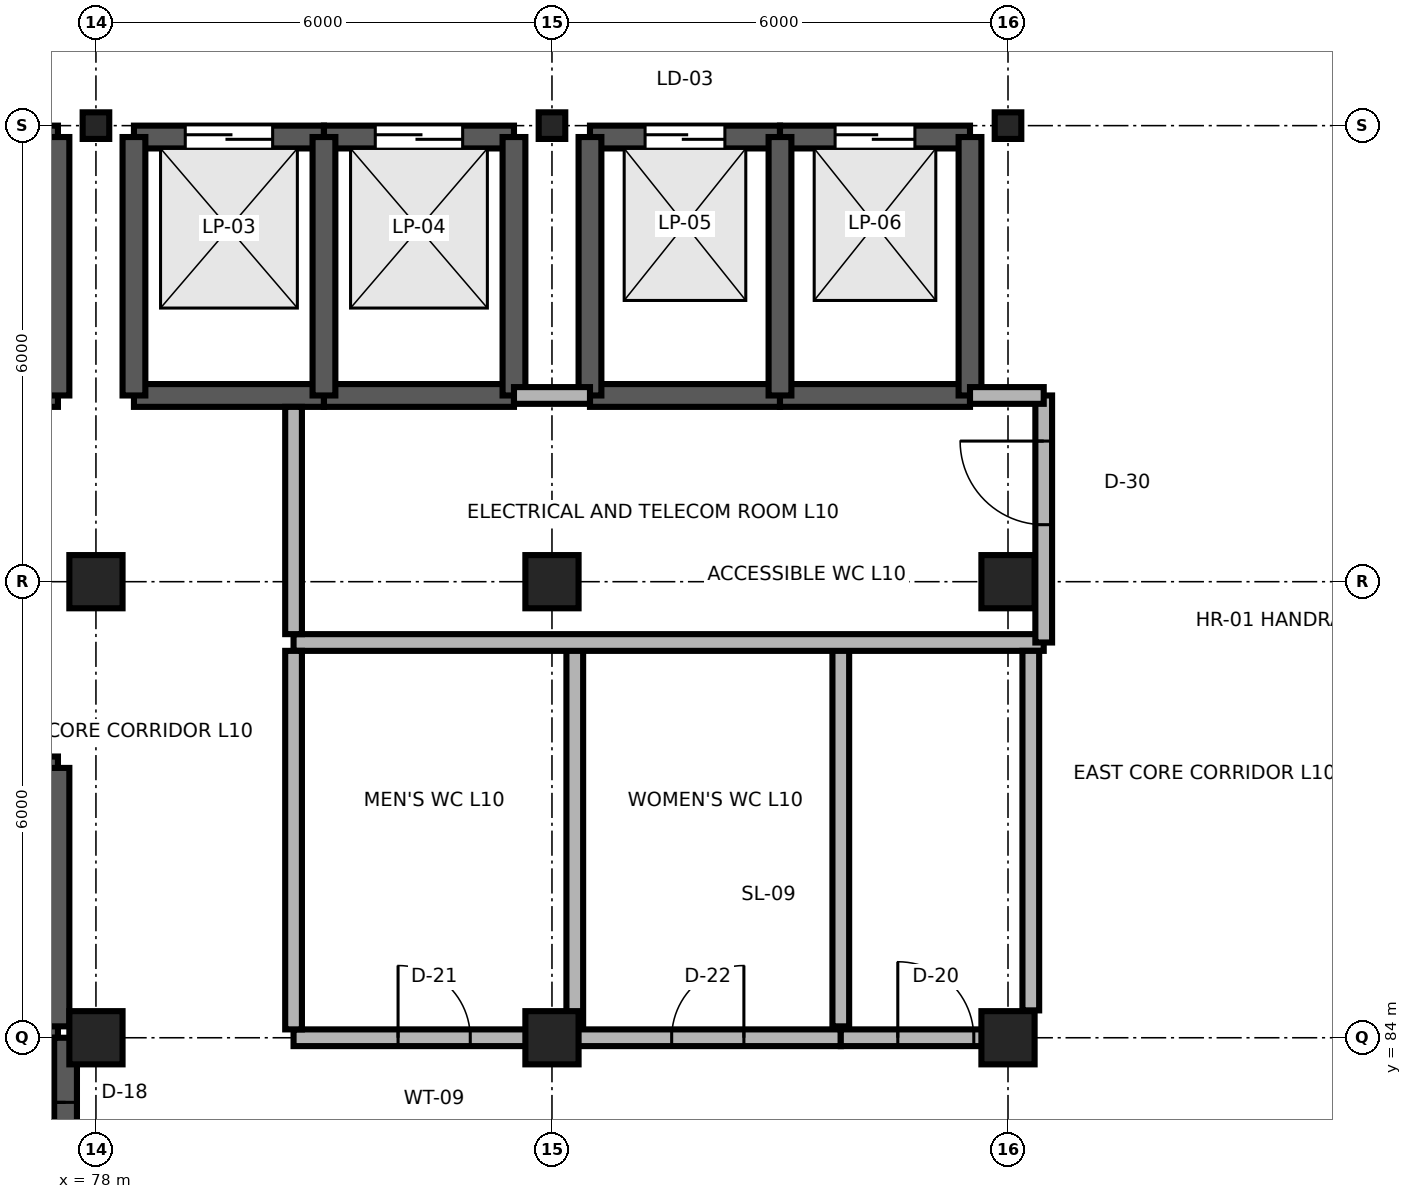
"""IFC4 building model, lengths in metres.
Left out: names, types, materials, properties, quantities, classifications, styles, units other than length and angle.
Written with IfcOpenShell. Run it as: python <this file> out.ifc"""

import sys

from ifc_helpers import new_model, si_unit, direction, frame, frame_2d, origin, origin_2d, place, context, subcontext, project, spatial, rectangle, i_section, extrude, element, fill, save


model = new_model("IFC4")
c1 = context("Model", 3, precision=1e-05, world=origin(), true_north=direction((0.0, 1.0)))
c2 = subcontext(c1, "Body", "Model", "MODEL_VIEW")
j1 = project(units=[si_unit("LENGTHUNIT", "METRE"), si_unit("PLANEANGLEUNIT", "RADIAN")], contexts=[c1])
p1 = place(None, origin())
s1 = spatial("IfcSite", under=j1, at=p1, CompositionType="ELEMENT")
p2 = place(p1, origin())
s2 = spatial("IfcBuilding", under=s1, at=p2, CompositionType="ELEMENT")
p3 = place(p2, frame((0.0, 0.0, 40.5)))
s3 = spatial("IfcBuildingStorey", under=s2, at=p3, CompositionType="ELEMENT", Elevation=40.5)
for number, where, z_axis, x_axis in (
    (1, (78.0, 84.0, 0.0), (0.0, 0.0, 1.0), (1.0, 0.0, 0.0)),
    (2, (84.0, 84.0, 0.0), (0.0, 0.0, 1.0), (1.0, 0.0, 0.0)),
    (3, (90.0, 84.0, 0.0), (0.0, 0.0, 1.0), (1.0, 0.0, 0.0)),
    (4, (78.0, 90.0, 0.0), (0.0, 0.0, 1.0), (1.0, 0.0, 0.0)),
    (5, (84.0, 90.0, 0.0), (0.0, 0.0, 1.0), (1.0, 0.0, 0.0)),
    (6, (90.0, 90.0, 0.0), (0.0, 0.0, 1.0), (1.0, 0.0, 0.0)),
):
    element("IfcColumn", number, at=place(p3, frame(where, z_axis=z_axis, x_axis=x_axis)), inside=s3, PredefinedType="COLUMN", context=c2, shape_type="SweptSolid", body=[
        extrude(rectangle(XDim=0.7, YDim=0.7, at=origin_2d()), origin(), (0.0, 0.0, 1.0), 3.9),
    ])
for number, where, z_axis, x_axis in (
    (7, (78.0, 96.0, 0.0), (0.0, 0.0, 1.0), (1.0, 0.0, 0.0)),
    (8, (84.0, 96.0, 0.0), (0.0, 0.0, 1.0), (1.0, 0.0, 0.0)),
    (9, (90.0, 96.0, 0.0), (0.0, 0.0, 1.0), (1.0, 0.0, 0.0)),
):
    element("IfcColumn", number, at=place(p3, frame(where, z_axis=z_axis, x_axis=x_axis)), inside=s3, PredefinedType="COLUMN", context=c2, shape_type="SweptSolid", body=[
        extrude(i_section(OverallWidth=0.35, OverallDepth=0.35, WebThickness=0.012, FlangeThickness=0.019, FilletRadius=0.02, at=origin_2d()), origin(), (0.0, 0.0, 1.0), 3.9),
    ])
p4 = place(p3, frame((75.0, 84.15, 0.0), z_axis=(0.0, 0.0, 1.0), x_axis=(1.0, 0.0, 0.0)))
e10 = element("IfcWall", 10, at=p4, inside=s3, PredefinedType="SHEAR", context=c2, shape_type="SweptSolid", body=[
    extrude(rectangle(XDim=2.5, YDim=0.3, at=frame_2d((1.25, 0.0))), origin(), (0.0, 0.0, 1.0), 3.74),
])
p5 = place(p4, frame((0.7, 0.0, 0.0)))
e11 = element("IfcOpeningElement", 11, at=p5, cuts=e10, PredefinedType="OPENING", context=c2, shape_type="SweptSolid", body=[
    extrude(rectangle(XDim=1.1, YDim=2.1, at=frame_2d((0.55, 1.05))), frame((0.0, 0.165, 0.0), z_axis=(0.0, -1.0, 0.0), x_axis=(1.0, 0.0, 0.0)), (0.0, 0.0, 1.0), 0.33),
])
p6 = place(p3, frame((75.0, 87.55, 0.0), z_axis=(0.0, 0.0, 1.0), x_axis=(1.0, 0.0, 0.0)))
e12 = element("IfcWall", 12, at=p6, inside=s3, PredefinedType="SHEAR", context=c2, shape_type="SweptSolid", body=[
    extrude(rectangle(XDim=2.5, YDim=0.3, at=frame_2d((1.25, 0.0))), origin(), (0.0, 0.0, 1.0), 3.74),
])
p7 = place(p3, frame((77.5, 84.15, 0.0), z_axis=(0.0, 0.0, 1.0), x_axis=(0.0, 1.0, 0.0)))
e13 = element("IfcWall", 13, at=p7, inside=s3, PredefinedType="SHEAR", context=c2, shape_type="SweptSolid", body=[
    extrude(rectangle(XDim=3.4, YDim=0.3, at=frame_2d((1.7, 0.0))), origin(), (0.0, 0.0, 1.0), 3.74),
])
p8 = place(p3, frame((75.0, 95.85, 0.0), z_axis=(0.0, 0.0, 1.0), x_axis=(1.0, 0.0, 0.0)))
e14 = element("IfcWall", 14, at=p8, inside=s3, PredefinedType="SHEAR", context=c2, shape_type="SweptSolid", body=[
    extrude(rectangle(XDim=2.5, YDim=0.3, at=frame_2d((1.25, 0.0))), origin(), (0.0, 0.0, 1.0), 3.74),
])
p9 = place(p8, frame((0.675, 0.0, 0.0)))
e15 = element("IfcOpeningElement", 15, at=p9, cuts=e14, PredefinedType="OPENING", context=c2, shape_type="SweptSolid", body=[
    extrude(rectangle(XDim=1.15, YDim=2.15, at=frame_2d((0.575, 1.075))), frame((0.0, 0.165, 0.0), z_axis=(0.0, -1.0, 0.0), x_axis=(1.0, 0.0, 0.0)), (0.0, 0.0, 1.0), 0.33),
])
p10 = place(p3, frame((75.0, 92.45, 0.0), z_axis=(0.0, 0.0, 1.0), x_axis=(1.0, 0.0, 0.0)))
e16 = element("IfcWall", 16, at=p10, inside=s3, PredefinedType="SHEAR", context=c2, shape_type="SweptSolid", body=[
    extrude(rectangle(XDim=2.5, YDim=0.3, at=frame_2d((1.25, 0.0))), origin(), (0.0, 0.0, 1.0), 3.74),
])
p11 = place(p3, frame((77.5, 92.45, 0.0), z_axis=(0.0, 0.0, 1.0), x_axis=(0.0, 1.0, 0.0)))
e17 = element("IfcWall", 17, at=p11, inside=s3, PredefinedType="SHEAR", context=c2, shape_type="SweptSolid", body=[
    extrude(rectangle(XDim=3.4, YDim=0.3, at=frame_2d((1.7, 0.0))), origin(), (0.0, 0.0, 1.0), 3.74),
])
p12 = place(p3, frame((78.5, 95.85, 0.0), z_axis=(0.0, 0.0, 1.0), x_axis=(1.0, 0.0, 0.0)))
e18 = element("IfcWall", 18, at=p12, inside=s3, PredefinedType="SHEAR", context=c2, shape_type="SweptSolid", body=[
    extrude(rectangle(XDim=2.5, YDim=0.3, at=frame_2d((1.25, 0.0))), origin(), (0.0, 0.0, 1.0), 3.74),
])
p13 = place(p12, frame((0.675, 0.0, 0.0)))
e19 = element("IfcOpeningElement", 19, at=p13, cuts=e18, PredefinedType="OPENING", context=c2, shape_type="SweptSolid", body=[
    extrude(rectangle(XDim=1.15, YDim=2.15, at=frame_2d((0.575, 1.075))), frame((0.0, 0.165, 0.0), z_axis=(0.0, -1.0, 0.0), x_axis=(1.0, 0.0, 0.0)), (0.0, 0.0, 1.0), 0.33),
])
p14 = place(p3, frame((78.5, 92.45, 0.0), z_axis=(0.0, 0.0, 1.0), x_axis=(1.0, 0.0, 0.0)))
e20 = element("IfcWall", 20, at=p14, inside=s3, PredefinedType="SHEAR", context=c2, shape_type="SweptSolid", body=[
    extrude(rectangle(XDim=2.5, YDim=0.3, at=frame_2d((1.25, 0.0))), origin(), (0.0, 0.0, 1.0), 3.74),
])
p15 = place(p3, frame((78.5, 92.45, 0.0), z_axis=(0.0, 0.0, 1.0), x_axis=(0.0, 1.0, 0.0)))
e21 = element("IfcWall", 21, at=p15, inside=s3, PredefinedType="SHEAR", context=c2, shape_type="SweptSolid", body=[
    extrude(rectangle(XDim=3.4, YDim=0.3, at=frame_2d((1.7, 0.0))), origin(), (0.0, 0.0, 1.0), 3.74),
])
p16 = place(p3, frame((81.0, 95.85, 0.0), z_axis=(0.0, 0.0, 1.0), x_axis=(1.0, 0.0, 0.0)))
e22 = element("IfcWall", 22, at=p16, inside=s3, PredefinedType="SHEAR", context=c2, shape_type="SweptSolid", body=[
    extrude(rectangle(XDim=2.5, YDim=0.3, at=frame_2d((1.25, 0.0))), origin(), (0.0, 0.0, 1.0), 3.74),
])
p17 = place(p16, frame((0.675, 0.0, 0.0)))
e23 = element("IfcOpeningElement", 23, at=p17, cuts=e22, PredefinedType="OPENING", context=c2, shape_type="SweptSolid", body=[
    extrude(rectangle(XDim=1.15, YDim=2.15, at=frame_2d((0.575, 1.075))), frame((0.0, 0.165, 0.0), z_axis=(0.0, -1.0, 0.0), x_axis=(1.0, 0.0, 0.0)), (0.0, 0.0, 1.0), 0.33),
])
p18 = place(p3, frame((81.0, 92.45, 0.0), z_axis=(0.0, 0.0, 1.0), x_axis=(1.0, 0.0, 0.0)))
e24 = element("IfcWall", 24, at=p18, inside=s3, PredefinedType="SHEAR", context=c2, shape_type="SweptSolid", body=[
    extrude(rectangle(XDim=2.5, YDim=0.3, at=frame_2d((1.25, 0.0))), origin(), (0.0, 0.0, 1.0), 3.74),
])
for number, where, z_axis, x_axis in (
    (25, (81.0, 92.45, 0.0), (0.0, 0.0, 1.0), (0.0, 1.0, 0.0)),
    (26, (83.5, 92.45, 0.0), (0.0, 0.0, 1.0), (0.0, 1.0, 0.0)),
):
    element("IfcWall", number, at=place(p3, frame(where, z_axis=z_axis, x_axis=x_axis)), inside=s3, PredefinedType="SHEAR", context=c2, shape_type="SweptSolid", body=[
        extrude(rectangle(XDim=3.4, YDim=0.3, at=frame_2d((1.7, 0.0))), origin(), (0.0, 0.0, 1.0), 3.74),
    ])
p19 = place(p3, frame((84.5, 95.85, 0.0), z_axis=(0.0, 0.0, 1.0), x_axis=(1.0, 0.0, 0.0)))
e27 = element("IfcWall", 27, at=p19, inside=s3, PredefinedType="SHEAR", context=c2, shape_type="SweptSolid", body=[
    extrude(rectangle(XDim=2.5, YDim=0.3, at=frame_2d((1.25, 0.0))), origin(), (0.0, 0.0, 1.0), 3.74),
])
p20 = place(p19, frame((0.725, 0.0, 0.0)))
e28 = element("IfcOpeningElement", 28, at=p20, cuts=e27, PredefinedType="OPENING", context=c2, shape_type="SweptSolid", body=[
    extrude(rectangle(XDim=1.05, YDim=2.1, at=frame_2d((0.525, 1.05))), frame((0.0, 0.165, 0.0), z_axis=(0.0, -1.0, 0.0), x_axis=(1.0, 0.0, 0.0)), (0.0, 0.0, 1.0), 0.33),
])
p21 = place(p3, frame((84.5, 92.45, 0.0), z_axis=(0.0, 0.0, 1.0), x_axis=(1.0, 0.0, 0.0)))
e29 = element("IfcWall", 29, at=p21, inside=s3, PredefinedType="SHEAR", context=c2, shape_type="SweptSolid", body=[
    extrude(rectangle(XDim=2.5, YDim=0.3, at=frame_2d((1.25, 0.0))), origin(), (0.0, 0.0, 1.0), 3.74),
])
p22 = place(p3, frame((84.5, 92.45, 0.0), z_axis=(0.0, 0.0, 1.0), x_axis=(0.0, 1.0, 0.0)))
e30 = element("IfcWall", 30, at=p22, inside=s3, PredefinedType="SHEAR", context=c2, shape_type="SweptSolid", body=[
    extrude(rectangle(XDim=3.4, YDim=0.3, at=frame_2d((1.7, 0.0))), origin(), (0.0, 0.0, 1.0), 3.74),
])
p23 = place(p3, frame((87.0, 95.85, 0.0), z_axis=(0.0, 0.0, 1.0), x_axis=(1.0, 0.0, 0.0)))
e31 = element("IfcWall", 31, at=p23, inside=s3, PredefinedType="SHEAR", context=c2, shape_type="SweptSolid", body=[
    extrude(rectangle(XDim=2.5, YDim=0.3, at=frame_2d((1.25, 0.0))), origin(), (0.0, 0.0, 1.0), 3.74),
])
p24 = place(p23, frame((0.725, 0.0, 0.0)))
e32 = element("IfcOpeningElement", 32, at=p24, cuts=e31, PredefinedType="OPENING", context=c2, shape_type="SweptSolid", body=[
    extrude(rectangle(XDim=1.05, YDim=2.1, at=frame_2d((0.525, 1.05))), frame((0.0, 0.165, 0.0), z_axis=(0.0, -1.0, 0.0), x_axis=(1.0, 0.0, 0.0)), (0.0, 0.0, 1.0), 0.33),
])
p25 = place(p3, frame((87.0, 92.45, 0.0), z_axis=(0.0, 0.0, 1.0), x_axis=(1.0, 0.0, 0.0)))
e33 = element("IfcWall", 33, at=p25, inside=s3, PredefinedType="SHEAR", context=c2, shape_type="SweptSolid", body=[
    extrude(rectangle(XDim=2.5, YDim=0.3, at=frame_2d((1.25, 0.0))), origin(), (0.0, 0.0, 1.0), 3.74),
])
for number, where, z_axis, x_axis in (
    (34, (87.0, 92.45, 0.0), (0.0, 0.0, 1.0), (0.0, 1.0, 0.0)),
    (35, (89.5, 92.45, 0.0), (0.0, 0.0, 1.0), (0.0, 1.0, 0.0)),
):
    element("IfcWall", number, at=place(p3, frame(where, z_axis=z_axis, x_axis=x_axis)), inside=s3, PredefinedType="SHEAR", context=c2, shape_type="SweptSolid", body=[
        extrude(rectangle(XDim=3.4, YDim=0.3, at=frame_2d((1.7, 0.0))), origin(), (0.0, 0.0, 1.0), 3.74),
    ])
p26 = place(p3, frame((77.6, 81.0, 0.0), z_axis=(0.0, 0.0, 1.0), x_axis=(0.0, 1.0, 0.0)))
e36 = element("IfcWall", 36, at=p26, inside=s3, PredefinedType="SHEAR", context=c2, shape_type="SweptSolid", body=[
    extrude(rectangle(XDim=3.0, YDim=0.3, at=frame_2d((1.5, 0.0))), origin(), (0.0, 0.0, 1.0), 3.74),
])
p27 = place(p26, frame((0.85, 0.0, 0.0)))
e37 = element("IfcOpeningElement", 37, at=p27, cuts=e36, PredefinedType="OPENING", context=c2, shape_type="SweptSolid", body=[
    extrude(rectangle(XDim=1.3, YDim=2.2, at=frame_2d((0.65, 1.1))), frame((0.0, 0.165, 0.0), z_axis=(0.0, -1.0, 0.0), x_axis=(1.0, 0.0, 0.0)), (0.0, 0.0, 1.0), 0.33),
])
p28 = place(p3, frame((80.6, 84.0, 0.0), z_axis=(0.0, 0.0, 1.0), x_axis=(1.0, 0.0, 0.0)))
e38 = element("IfcWall", 38, at=p28, inside=s3, PredefinedType="PARTITIONING", context=c2, shape_type="SweptSolid", body=[
    extrude(rectangle(XDim=3.7, YDim=0.22, at=frame_2d((1.85, 0.0))), origin(), (0.0, 0.0, 1.0), 3.348),
])
p29 = place(p28, frame((1.375, 0.0, 0.0)))
e39 = element("IfcOpeningElement", 39, at=p29, cuts=e38, PredefinedType="OPENING", context=c2, shape_type="SweptSolid", body=[
    extrude(rectangle(XDim=0.95, YDim=2.15, at=frame_2d((0.475, 1.075))), frame((0.0, 0.125, 0.0), z_axis=(0.0, -1.0, 0.0), x_axis=(1.0, 0.0, 0.0)), (0.0, 0.0, 1.0), 0.25),
])
p30 = place(p3, frame((84.3, 84.0, 0.0), z_axis=(0.0, 0.0, 1.0), x_axis=(1.0, 0.0, 0.0)))
e40 = element("IfcWall", 40, at=p30, inside=s3, PredefinedType="PARTITIONING", context=c2, shape_type="SweptSolid", body=[
    extrude(rectangle(XDim=3.5, YDim=0.22, at=frame_2d((1.75, 0.0))), origin(), (0.0, 0.0, 1.0), 3.348),
])
p31 = place(p30, frame((1.275, 0.0, 0.0)))
e41 = element("IfcOpeningElement", 41, at=p31, cuts=e40, PredefinedType="OPENING", context=c2, shape_type="SweptSolid", body=[
    extrude(rectangle(XDim=0.95, YDim=2.1, at=frame_2d((0.475, 1.05))), frame((0.0, 0.125, 0.0), z_axis=(0.0, -1.0, 0.0), x_axis=(1.0, 0.0, 0.0)), (0.0, 0.0, 1.0), 0.25),
])
p32 = place(p3, frame((87.8, 84.0, 0.0), z_axis=(0.0, 0.0, 1.0), x_axis=(1.0, 0.0, 0.0)))
e42 = element("IfcWall", 42, at=p32, inside=s3, PredefinedType="PARTITIONING", context=c2, shape_type="SweptSolid", body=[
    extrude(rectangle(XDim=2.5, YDim=0.22, at=frame_2d((1.25, 0.0))), origin(), (0.0, 0.0, 1.0), 3.348),
])
p33 = place(p32, frame((0.75, 0.0, 0.0)))
e43 = element("IfcOpeningElement", 43, at=p33, cuts=e42, PredefinedType="OPENING", context=c2, shape_type="SweptSolid", body=[
    extrude(rectangle(XDim=1.0, YDim=2.15, at=frame_2d((0.5, 1.075))), frame((0.0, 0.125, 0.0), z_axis=(0.0, -1.0, 0.0), x_axis=(1.0, 0.0, 0.0)), (0.0, 0.0, 1.0), 0.25),
])
for number, where, z_axis, x_axis in (
    (44, (84.3, 84.15, 0.0), (0.0, 0.0, 1.0), (0.0, 1.0, 0.0)),
    (45, (87.8, 84.15, 0.0), (0.0, 0.0, 1.0), (0.0, 1.0, 0.0)),
):
    element("IfcWall", number, at=place(p3, frame(where, z_axis=z_axis, x_axis=x_axis)), inside=s3, PredefinedType="PARTITIONING", context=c2, shape_type="SweptSolid", body=[
        extrude(rectangle(XDim=5.0, YDim=0.22, at=frame_2d((2.5, 0.0))), origin(), (0.0, 0.0, 1.0), 3.74),
    ])
p34 = place(p3, frame((80.6, 89.2, 0.0), z_axis=(0.0, 0.0, 1.0), x_axis=(1.0, 0.0, 0.0)))
e46 = element("IfcWall", 46, at=p34, inside=s3, PredefinedType="PARTITIONING", context=c2, shape_type="SweptSolid", body=[
    extrude(rectangle(XDim=9.87, YDim=0.22, at=frame_2d((4.935, 0.0))), origin(), (0.0, 0.0, 1.0), 3.74),
])
p35 = place(p3, frame((90.47, 89.2, 0.0), z_axis=(0.0, 0.0, 1.0), x_axis=(0.0, 1.0, 0.0)))
e47 = element("IfcWall", 47, at=p35, inside=s3, PredefinedType="PARTITIONING", context=c2, shape_type="SweptSolid", body=[
    extrude(rectangle(XDim=3.25, YDim=0.22, at=frame_2d((1.625, 0.0))), origin(), (0.0, 0.0, 1.0), 3.74),
])
p36 = place(p35, frame((1.55, 0.0, 0.0)))
e48 = element("IfcOpeningElement", 48, at=p36, cuts=e47, PredefinedType="OPENING", context=c2, shape_type="SweptSolid", body=[
    extrude(rectangle(XDim=1.1, YDim=2.15, at=frame_2d((0.55, 1.075))), frame((0.0, 0.125, 0.0), z_axis=(0.0, -1.0, 0.0), x_axis=(1.0, 0.0, 0.0)), (0.0, 0.0, 1.0), 0.25),
])
p37 = place(p3, frame((80.6, 84.11, 0.0), z_axis=(0.0, 0.0, 1.0), x_axis=(0.0, 1.0, 0.0)))
e49 = element("IfcWall", 49, at=p37, inside=s3, PredefinedType="PARTITIONING", context=c2, shape_type="SweptSolid", body=[
    extrude(rectangle(XDim=4.98, YDim=0.22, at=frame_2d((2.49, 0.0))), origin(), (0.0, 0.0, 1.0), 3.74),
])
p38 = place(p3, frame((90.3, 84.36, 0.0), z_axis=(0.0, 0.0, 1.0), x_axis=(0.0, 1.0, 0.0)))
e50 = element("IfcWall", 50, at=p38, inside=s3, PredefinedType="PARTITIONING", context=c2, shape_type="SweptSolid", body=[
    extrude(rectangle(XDim=4.73, YDim=0.22, at=frame_2d((2.365, 0.0))), origin(), (0.0, 0.0, 1.0), 3.74),
])
p39 = place(p3, frame((80.6, 89.31, 0.0), z_axis=(0.0, 0.0, 1.0), x_axis=(0.0, 1.0, 0.0)))
e51 = element("IfcWall", 51, at=p39, inside=s3, PredefinedType="PARTITIONING", context=c2, shape_type="SweptSolid", body=[
    extrude(rectangle(XDim=2.99, YDim=0.22, at=frame_2d((1.495, 0.0))), origin(), (0.0, 0.0, 1.0), 3.74),
])
p40 = place(p3, frame((83.5, 92.45, 0.0), z_axis=(0.0, 0.0, 1.0), x_axis=(1.0, 0.0, 0.0)))
e52 = element("IfcWall", 52, at=p40, inside=s3, PredefinedType="PARTITIONING", context=c2, shape_type="SweptSolid", body=[
    extrude(rectangle(XDim=1.0, YDim=0.22, at=frame_2d((0.5, 0.0))), origin(), (0.0, 0.0, 1.0), 3.74),
])
p41 = place(p3, frame((89.5, 92.45, 0.0), z_axis=(0.0, 0.0, 1.0), x_axis=(1.0, 0.0, 0.0)))
e53 = element("IfcWall", 53, at=p41, inside=s3, PredefinedType="PARTITIONING", context=c2, shape_type="SweptSolid", body=[
    extrude(rectangle(XDim=0.97, YDim=0.22, at=frame_2d((0.485, 0.0))), origin(), (0.0, 0.0, 1.0), 3.74),
])
p42 = place(p13, origin())
e54 = element("IfcDoor", 54, at=p42, inside=s3, OperationType="DOUBLE_DOOR_SLIDING", PredefinedType="DOOR", context=c2, shape_type="SweptSolid", body=[
    extrude(rectangle(XDim=1.15, YDim=2.15, at=frame_2d((0.575, 1.075))), frame((0.0, 0.025, 0.0), z_axis=(0.0, -1.0, 0.0), x_axis=(1.0, 0.0, 0.0)), (0.0, 0.0, 1.0), 0.05),
])
fill(e19, e54)
p43 = place(p17, origin())
e55 = element("IfcDoor", 55, at=p43, inside=s3, OperationType="DOUBLE_DOOR_SLIDING", PredefinedType="DOOR", context=c2, shape_type="SweptSolid", body=[
    extrude(rectangle(XDim=1.15, YDim=2.15, at=frame_2d((0.575, 1.075))), frame((0.0, 0.025, 0.0), z_axis=(0.0, -1.0, 0.0), x_axis=(1.0, 0.0, 0.0)), (0.0, 0.0, 1.0), 0.05),
])
fill(e23, e55)
p44 = place(p20, origin())
e56 = element("IfcDoor", 56, at=p44, inside=s3, OperationType="DOUBLE_DOOR_SLIDING", PredefinedType="DOOR", context=c2, shape_type="SweptSolid", body=[
    extrude(rectangle(XDim=1.05, YDim=2.1, at=frame_2d((0.525, 1.05))), frame((0.0, 0.025, 0.0), z_axis=(0.0, -1.0, 0.0), x_axis=(1.0, 0.0, 0.0)), (0.0, 0.0, 1.0), 0.05),
])
fill(e28, e56)
p45 = place(p24, origin())
e57 = element("IfcDoor", 57, at=p45, inside=s3, OperationType="DOUBLE_DOOR_SLIDING", PredefinedType="DOOR", context=c2, shape_type="SweptSolid", body=[
    extrude(rectangle(XDim=1.05, YDim=2.1, at=frame_2d((0.525, 1.05))), frame((0.0, 0.025, 0.0), z_axis=(0.0, -1.0, 0.0), x_axis=(1.0, 0.0, 0.0)), (0.0, 0.0, 1.0), 0.05),
])
fill(e32, e57)
p46 = place(p27, origin())
e58 = element("IfcDoor", 58, at=p46, inside=s3, OperationType="SINGLE_SWING_RIGHT", PredefinedType="DOOR", context=c2, shape_type="SweptSolid", body=[
    extrude(rectangle(XDim=1.3, YDim=2.2, at=frame_2d((0.65, 1.1))), frame((0.0, 0.025, 0.0), z_axis=(0.0, -1.0, 0.0), x_axis=(1.0, 0.0, 0.0)), (0.0, 0.0, 1.0), 0.05),
])
fill(e37, e58)
p47 = place(p29, origin())
e59 = element("IfcDoor", 59, at=p47, inside=s3, OperationType="SINGLE_SWING_LEFT", PredefinedType="DOOR", context=c2, shape_type="SweptSolid", body=[
    extrude(rectangle(XDim=0.95, YDim=2.15, at=frame_2d((0.475, 1.075))), frame((0.0, 0.025, 0.0), z_axis=(0.0, -1.0, 0.0), x_axis=(1.0, 0.0, 0.0)), (0.0, 0.0, 1.0), 0.05),
])
fill(e39, e59)
p48 = place(p31, origin())
e60 = element("IfcDoor", 60, at=p48, inside=s3, OperationType="SINGLE_SWING_RIGHT", PredefinedType="DOOR", context=c2, shape_type="SweptSolid", body=[
    extrude(rectangle(XDim=0.95, YDim=2.1, at=frame_2d((0.475, 1.05))), frame((0.0, 0.025, 0.0), z_axis=(0.0, -1.0, 0.0), x_axis=(1.0, 0.0, 0.0)), (0.0, 0.0, 1.0), 0.05),
])
fill(e41, e60)
p49 = place(p33, origin())
e61 = element("IfcDoor", 61, at=p49, inside=s3, OperationType="SINGLE_SWING_LEFT", PredefinedType="DOOR", context=c2, shape_type="SweptSolid", body=[
    extrude(rectangle(XDim=1.0, YDim=2.15, at=frame_2d((0.5, 1.075))), frame((0.0, 0.025, 0.0), z_axis=(0.0, -1.0, 0.0), x_axis=(1.0, 0.0, 0.0)), (0.0, 0.0, 1.0), 0.05),
])
fill(e43, e61)
p50 = place(p36, origin())
e62 = element("IfcDoor", 62, at=p50, inside=s3, OperationType="SINGLE_SWING_RIGHT", PredefinedType="DOOR", context=c2, shape_type="SweptSolid", body=[
    extrude(rectangle(XDim=1.1, YDim=2.15, at=frame_2d((0.55, 1.075))), frame((0.0, 0.025, 0.0), z_axis=(0.0, -1.0, 0.0), x_axis=(1.0, 0.0, 0.0)), (0.0, 0.0, 1.0), 0.05),
])
fill(e48, e62)
save(model, sys.argv[1])
